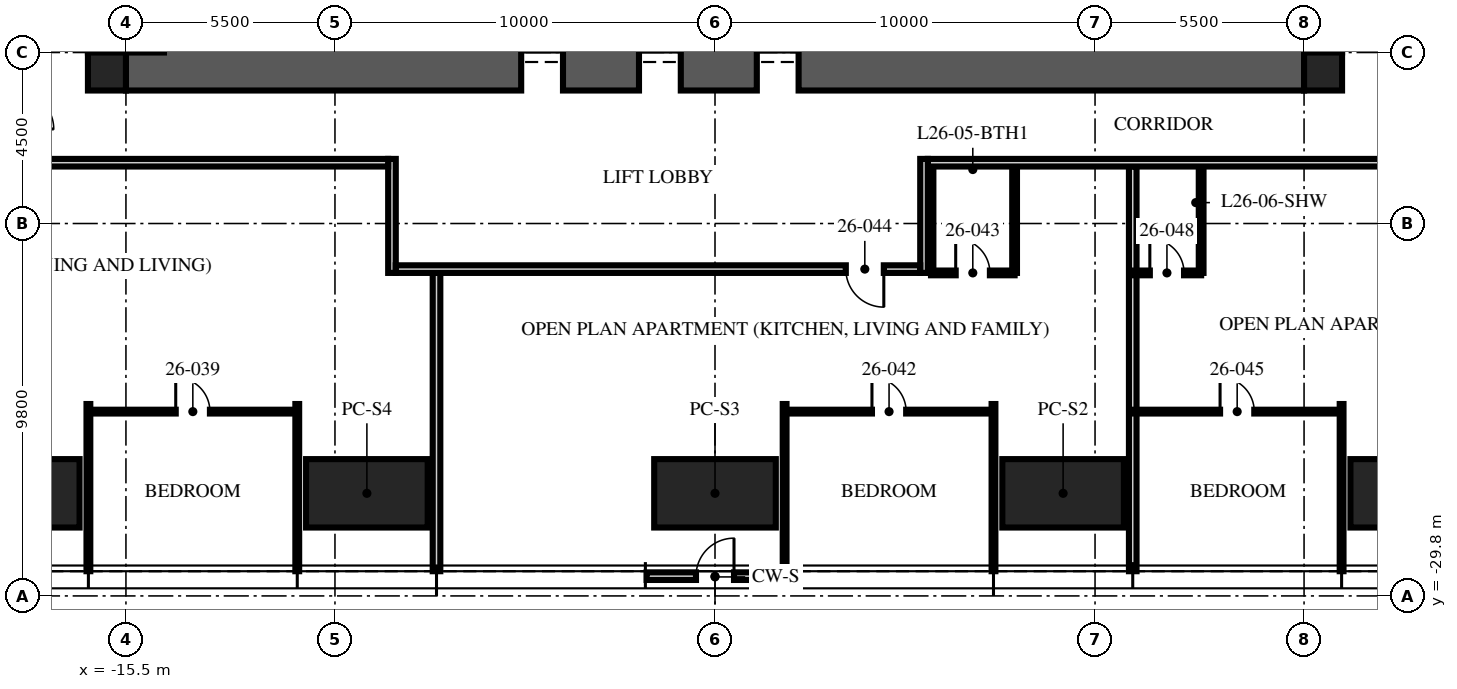
"""IFC4 building model, lengths in metres.
Left out: names, types, materials, properties, quantities, classifications, styles, units other than length and angle.
Written with IfcOpenShell. Run it as: python <this file> out.ifc"""

import sys

from ifc_helpers import new_model, si_unit, direction, frame, frame_2d, origin, origin_2d, place, context, subcontext, project, spatial, rectangle, hollow_rectangle, extrude, element, fill, save


model = new_model("IFC4")
c1 = context("Model", 3, precision=1e-05, world=origin(), true_north=direction((0.0, 1.0)))
c2 = subcontext(c1, "Body", "Model", "MODEL_VIEW")
j1 = project(units=[si_unit("LENGTHUNIT", "METRE"), si_unit("PLANEANGLEUNIT", "RADIAN")], contexts=[c1])
p1 = place(None, origin())
s1 = spatial("IfcSite", under=j1, at=p1, CompositionType="ELEMENT")
p2 = place(p1, origin())
s2 = spatial("IfcBuilding", under=s1, at=p2, CompositionType="ELEMENT")
p3 = place(p2, frame((0.0, 0.0, 107.25)))
s3 = spatial("IfcBuildingStorey", under=s2, at=p3, CompositionType="ELEMENT", Elevation=107.25)
p4 = place(p3, frame((-15.5, -15.5, -0.25), z_axis=(0.0, 0.0, 1.0), x_axis=(1.0, 0.0, 0.0)))
e1 = element("IfcWall", 1, at=p4, inside=s3, PredefinedType="SHEAR", context=c2, shape_type="SweptSolid", body=[
    extrude(rectangle(XDim=31.0, YDim=2.0, at=frame_2d((15.5, 0.0))), origin(), (0.0, 0.0, 1.0), 3.75),
])
p5 = place(p4, frame((10.4, 0.0, 0.25)))
e2 = element("IfcOpeningElement", 2, at=p5, cuts=e1, PredefinedType="OPENING", context=c2, shape_type="SweptSolid", body=[
    extrude(rectangle(XDim=1.1, YDim=2.1, at=frame_2d((0.55, 1.05))), frame((0.0, 1.01, 0.0), z_axis=(0.0, -1.0, 0.0), x_axis=(1.0, 0.0, 0.0)), (0.0, 0.0, 1.0), 2.02),
])
p6 = place(p4, frame((13.5, 0.0, 0.25)))
e3 = element("IfcOpeningElement", 3, at=p6, cuts=e1, PredefinedType="OPENING", context=c2, shape_type="SweptSolid", body=[
    extrude(rectangle(XDim=1.1, YDim=2.1, at=frame_2d((0.55, 1.05))), frame((0.0, 1.01, 0.0), z_axis=(0.0, -1.0, 0.0), x_axis=(1.0, 0.0, 0.0)), (0.0, 0.0, 1.0), 2.02),
])
p7 = place(p4, frame((16.6, 0.0, 0.25)))
e4 = element("IfcOpeningElement", 4, at=p7, cuts=e1, PredefinedType="OPENING", context=c2, shape_type="SweptSolid", body=[
    extrude(rectangle(XDim=1.1, YDim=2.1, at=frame_2d((0.55, 1.05))), frame((0.0, 1.01, 0.0), z_axis=(0.0, -1.0, 0.0), x_axis=(1.0, 0.0, 0.0)), (0.0, 0.0, 1.0), 2.02),
])
for number, where, z_axis, x_axis in (
    (5, (-16.0, -16.0, -0.25), (0.0, 0.0, 1.0), (1.0, 0.0, 0.0)),
    (6, (16.0, -16.0, -0.25), (0.0, 0.0, 1.0), (1.0, 0.0, 0.0)),
):
    element("IfcColumn", number, at=place(p3, frame(where, z_axis=z_axis, x_axis=x_axis)), inside=s3, PredefinedType="COLUMN", context=c2, shape_type="SweptSolid", body=[
        extrude(rectangle(XDim=1.0, YDim=1.0, at=origin_2d()), origin(), (0.0, 0.0, 1.0), 3.75),
    ])
p8 = place(p3, frame((18.32, -27.1, 0.08), z_axis=(0.0, 0.0, 1.0), x_axis=(1.0, 0.0, 0.0)))
e7 = element("IfcColumn", 7, at=p8, inside=s3, PredefinedType="COLUMN", context=c2, shape_type="SweptSolid", body=[
    extrude(hollow_rectangle(XDim=3.2, YDim=1.8, WallThickness=0.2, at=origin_2d()), origin(), (0.0, 0.0, 1.0), 3.67),
])
p9 = place(p3, frame((9.16, -27.1, -0.07), z_axis=(0.0, 0.0, 1.0), x_axis=(1.0, 0.0, 0.0)))
e8 = element("IfcColumn", 8, at=p9, inside=s3, PredefinedType="COLUMN", context=c2, shape_type="SweptSolid", body=[
    extrude(hollow_rectangle(XDim=3.2, YDim=1.8, WallThickness=0.2, at=origin_2d()), origin(), (0.0, 0.0, 1.0), 3.82),
])
p10 = place(p3, frame((0.0, -27.1, -0.23), z_axis=(0.0, 0.0, 1.0), x_axis=(1.0, 0.0, 0.0)))
e9 = element("IfcColumn", 9, at=p10, inside=s3, PredefinedType="COLUMN", context=c2, shape_type="SweptSolid", body=[
    extrude(hollow_rectangle(XDim=3.2, YDim=1.8, WallThickness=0.2, at=origin_2d()), origin(), (0.0, 0.0, 1.0), 3.98),
])
p11 = place(p3, frame((-9.16, -27.1, -0.07), z_axis=(0.0, 0.0, 1.0), x_axis=(1.0, 0.0, 0.0)))
e10 = element("IfcColumn", 10, at=p11, inside=s3, PredefinedType="COLUMN", context=c2, shape_type="SweptSolid", body=[
    extrude(hollow_rectangle(XDim=3.2, YDim=1.8, WallThickness=0.2, at=origin_2d()), origin(), (0.0, 0.0, 1.0), 3.82),
])
p12 = place(p3, frame((-18.32, -27.1, 0.08), z_axis=(0.0, 0.0, 1.0), x_axis=(1.0, 0.0, 0.0)))
e11 = element("IfcColumn", 11, at=p12, inside=s3, PredefinedType="COLUMN", context=c2, shape_type="SweptSolid", body=[
    extrude(hollow_rectangle(XDim=3.2, YDim=1.8, WallThickness=0.2, at=origin_2d()), origin(), (0.0, 0.0, 1.0), 3.67),
])
p13 = place(p3, frame((-1.8, -29.28, 0.0), z_axis=(0.0, 0.0, 1.0), x_axis=(1.0, 0.0, 0.0)))
e12 = element("IfcWall", 12, at=p13, inside=s3, PredefinedType="ELEMENTEDWALL", context=c2, shape_type="SweptSolid", body=[
    extrude(rectangle(XDim=3.599, YDim=0.2, at=frame_2d((1.8, 0.0))), origin(), (0.0, 0.0, 1.0), 3.75),
])
p14 = place(p13, frame((1.3, 0.0, 0.0)))
e13 = element("IfcOpeningElement", 13, at=p14, cuts=e12, PredefinedType="OPENING", context=c2, shape_type="SweptSolid", body=[
    extrude(rectangle(XDim=1.0, YDim=2.4, at=frame_2d((0.5, 1.2))), frame((0.0, 0.11, 0.0), z_axis=(0.0, -1.0, 0.0), x_axis=(1.0, 0.0, 0.0)), (0.0, 0.0, 1.0), 0.22),
])
for number, where, z_axis, x_axis in (
    (14, (-16.488, -24.75, 0.0), (0.0, 0.0, 1.0), (0.0, -1.0, 0.0)),
    (15, (-10.992, -24.75, 0.0), (0.0, 0.0, 1.0), (0.0, -1.0, 0.0)),
):
    element("IfcWall", number, at=place(p3, frame(where, z_axis=z_axis, x_axis=x_axis)), inside=s3, PredefinedType="PARTITIONING", context=c2, shape_type="SweptSolid", body=[
        extrude(rectangle(XDim=4.4, YDim=0.1, at=frame_2d((2.2, 0.0))), origin(), (0.0, 0.0, 1.0), 2.81),
    ])
p15 = place(p3, frame((-7.328, -21.3, 0.0), z_axis=(0.0, 0.0, 1.0), x_axis=(0.0, -1.0, 0.0)))
e16 = element("IfcWall", 16, at=p15, inside=s3, PredefinedType="PARTITIONING", context=c2, shape_type="SweptSolid", body=[
    extrude(rectangle(XDim=7.85, YDim=0.2, at=frame_2d((3.925, 0.0))), origin(), (0.0, 0.0, 1.0), 2.81),
])
for number, where, z_axis, x_axis in (
    (17, (1.832, -24.75, 0.0), (0.0, 0.0, 1.0), (0.0, -1.0, 0.0)),
    (18, (7.328, -24.75, 0.0), (0.0, 0.0, 1.0), (0.0, -1.0, 0.0)),
):
    element("IfcWall", number, at=place(p3, frame(where, z_axis=z_axis, x_axis=x_axis)), inside=s3, PredefinedType="PARTITIONING", context=c2, shape_type="SweptSolid", body=[
        extrude(rectangle(XDim=4.4, YDim=0.1, at=frame_2d((2.2, 0.0))), origin(), (0.0, 0.0, 1.0), 2.81),
    ])
p16 = place(p3, frame((10.992, -18.5, 0.0), z_axis=(0.0, 0.0, 1.0), x_axis=(0.0, -1.0, 0.0)))
e19 = element("IfcWall", 19, at=p16, inside=s3, PredefinedType="PARTITIONING", context=c2, shape_type="SweptSolid", body=[
    extrude(rectangle(XDim=10.65, YDim=0.2, at=frame_2d((5.325, 0.0))), origin(), (0.0, 0.0, 1.0), 2.81),
])
p17 = place(p3, frame((16.488, -24.75, 0.0), z_axis=(0.0, 0.0, 1.0), x_axis=(0.0, -1.0, 0.0)))
e20 = element("IfcWall", 20, at=p17, inside=s3, PredefinedType="PARTITIONING", context=c2, shape_type="SweptSolid", body=[
    extrude(rectangle(XDim=4.4, YDim=0.1, at=frame_2d((2.2, 0.0))), origin(), (0.0, 0.0, 1.0), 2.81),
])
p18 = place(p3, frame((-16.488, -24.95, 0.0), z_axis=(0.0, 0.0, 1.0), x_axis=(1.0, 0.0, 0.0)))
e21 = element("IfcWall", 21, at=p18, inside=s3, PredefinedType="PARTITIONING", context=c2, shape_type="SweptSolid", body=[
    extrude(rectangle(XDim=5.496, YDim=0.1, at=frame_2d((2.748, 0.0))), origin(), (0.0, 0.0, 1.0), 2.81),
])
p19 = place(p18, frame((2.298, 0.0, 0.0)))
e22 = element("IfcOpeningElement", 22, at=p19, cuts=e21, PredefinedType="OPENING", context=c2, shape_type="SweptSolid", body=[
    extrude(rectangle(XDim=0.9, YDim=2.1, at=frame_2d((0.45, 1.05))), frame((0.0, 0.06, 0.0), z_axis=(0.0, -1.0, 0.0), x_axis=(1.0, 0.0, 0.0)), (0.0, 0.0, 1.0), 0.12),
])
p20 = place(p3, frame((1.832, -24.95, 0.0), z_axis=(0.0, 0.0, 1.0), x_axis=(1.0, 0.0, 0.0)))
e23 = element("IfcWall", 23, at=p20, inside=s3, PredefinedType="PARTITIONING", context=c2, shape_type="SweptSolid", body=[
    extrude(rectangle(XDim=5.496, YDim=0.1, at=frame_2d((2.748, 0.0))), origin(), (0.0, 0.0, 1.0), 2.81),
])
p21 = place(p20, frame((2.298, 0.0, 0.0)))
e24 = element("IfcOpeningElement", 24, at=p21, cuts=e23, PredefinedType="OPENING", context=c2, shape_type="SweptSolid", body=[
    extrude(rectangle(XDim=0.9, YDim=2.1, at=frame_2d((0.45, 1.05))), frame((0.0, 0.06, 0.0), z_axis=(0.0, -1.0, 0.0), x_axis=(1.0, 0.0, 0.0)), (0.0, 0.0, 1.0), 0.12),
])
p22 = place(p3, frame((5.684, -21.3, 0.0), z_axis=(0.0, 0.0, 1.0), x_axis=(1.0, 0.0, 0.0)))
e25 = element("IfcWall", 25, at=p22, inside=s3, PredefinedType="PARTITIONING", context=c2, shape_type="SweptSolid", body=[
    extrude(rectangle(XDim=2.2, YDim=0.125, at=frame_2d((1.1, 0.0))), origin(), (0.0, 0.0, 1.0), 3.5),
])
p23 = place(p22, frame((0.65, 0.0, 0.0)))
e26 = element("IfcOpeningElement", 26, at=p23, cuts=e25, PredefinedType="OPENING", context=c2, shape_type="SweptSolid", body=[
    extrude(rectangle(XDim=0.9, YDim=2.1, at=frame_2d((0.45, 1.05))), frame((0.0, 0.073, 0.0), z_axis=(0.0, -1.0, 0.0), x_axis=(1.0, 0.0, 0.0)), (0.0, 0.0, 1.0), 0.145),
])
for number, where, z_axis, x_axis in (
    (27, (5.684, -18.5, 0.0), (0.0, 0.0, 1.0), (0.0, -1.0, 0.0)),
    (28, (7.884, -18.5, 0.0), (0.0, 0.0, 1.0), (0.0, -1.0, 0.0)),
):
    element("IfcWall", number, at=place(p3, frame(where, z_axis=z_axis, x_axis=x_axis)), inside=s3, PredefinedType="PARTITIONING", context=c2, shape_type="SweptSolid", body=[
        extrude(rectangle(XDim=2.8, YDim=0.125, at=frame_2d((1.4, 0.0))), origin(), (0.0, 0.0, 1.0), 3.5),
    ])
p24 = place(p3, frame((10.992, -24.95, 0.0), z_axis=(0.0, 0.0, 1.0), x_axis=(1.0, 0.0, 0.0)))
e29 = element("IfcWall", 29, at=p24, inside=s3, PredefinedType="PARTITIONING", context=c2, shape_type="SweptSolid", body=[
    extrude(rectangle(XDim=5.496, YDim=0.1, at=frame_2d((2.748, 0.0))), origin(), (0.0, 0.0, 1.0), 2.81),
])
p25 = place(p24, frame((2.298, 0.0, 0.0)))
e30 = element("IfcOpeningElement", 30, at=p25, cuts=e29, PredefinedType="OPENING", context=c2, shape_type="SweptSolid", body=[
    extrude(rectangle(XDim=0.9, YDim=2.1, at=frame_2d((0.45, 1.05))), frame((0.0, 0.06, 0.0), z_axis=(0.0, -1.0, 0.0), x_axis=(1.0, 0.0, 0.0)), (0.0, 0.0, 1.0), 0.12),
])
p26 = place(p3, frame((10.992, -21.3, 0.0), z_axis=(0.0, 0.0, 1.0), x_axis=(1.0, 0.0, 0.0)))
e31 = element("IfcWall", 31, at=p26, inside=s3, PredefinedType="PARTITIONING", context=c2, shape_type="SweptSolid", body=[
    extrude(rectangle(XDim=1.8, YDim=0.125, at=frame_2d((0.9, 0.0))), origin(), (0.0, 0.0, 1.0), 3.5),
])
p27 = place(p26, frame((0.45, 0.0, 0.0)))
e32 = element("IfcOpeningElement", 32, at=p27, cuts=e31, PredefinedType="OPENING", context=c2, shape_type="SweptSolid", body=[
    extrude(rectangle(XDim=0.9, YDim=2.1, at=frame_2d((0.45, 1.05))), frame((0.0, 0.073, 0.0), z_axis=(0.0, -1.0, 0.0), x_axis=(1.0, 0.0, 0.0)), (0.0, 0.0, 1.0), 0.145),
])
p28 = place(p3, frame((12.792, -18.5, 0.0), z_axis=(0.0, 0.0, 1.0), x_axis=(0.0, -1.0, 0.0)))
e33 = element("IfcWall", 33, at=p28, inside=s3, PredefinedType="PARTITIONING", context=c2, shape_type="SweptSolid", body=[
    extrude(rectangle(XDim=2.8, YDim=0.125, at=frame_2d((1.4, 0.0))), origin(), (0.0, 0.0, 1.0), 3.5),
])
p29 = place(p3, frame((18.5, -18.4, 0.0), z_axis=(0.0, 0.0, 1.0), x_axis=(-1.0, 0.0, 0.0)))
e34 = element("IfcWall", 34, at=p29, inside=s3, PredefinedType="PARTITIONING", context=c2, shape_type="SweptSolid", body=[
    extrude(rectangle(XDim=12.9, YDim=0.2, at=frame_2d((6.45, 0.0))), origin(), (0.0, 0.0, 1.0), 2.3),
])
for number, where, z_axis, x_axis in (
    (35, (5.5, -18.3, 0.0), (0.0, 0.0, 1.0), (0.0, -1.0, 0.0)),
    (36, (-8.5, -18.3, 0.0), (0.0, 0.0, 1.0), (0.0, -1.0, 0.0)),
):
    element("IfcWall", number, at=place(p3, frame(where, z_axis=z_axis, x_axis=x_axis)), inside=s3, PredefinedType="PARTITIONING", context=c2, shape_type="SweptSolid", body=[
        extrude(rectangle(XDim=3.0, YDim=0.2, at=frame_2d((1.5, 0.0))), origin(), (0.0, 0.0, 1.0), 3.5),
    ])
p30 = place(p3, frame((5.4, -21.2, 0.0), z_axis=(0.0, 0.0, 1.0), x_axis=(-1.0, 0.0, 0.0)))
e37 = element("IfcWall", 37, at=p30, inside=s3, PredefinedType="PARTITIONING", context=c2, shape_type="SweptSolid", body=[
    extrude(rectangle(XDim=13.8, YDim=0.2, at=frame_2d((6.9, 0.0))), origin(), (0.0, 0.0, 1.0), 2.7),
])
p31 = place(p30, frame((0.958, 0.0, 0.0)))
e38 = element("IfcOpeningElement", 38, at=p31, cuts=e37, PredefinedType="OPENING", context=c2, shape_type="SweptSolid", body=[
    extrude(rectangle(XDim=1.0, YDim=2.2, at=frame_2d((0.5, 1.1))), frame((0.0, 0.11, 0.0), z_axis=(0.0, -1.0, 0.0), x_axis=(1.0, 0.0, 0.0)), (0.0, 0.0, 1.0), 0.22),
])
p32 = place(p3, frame((-8.6, -18.4, 0.0), z_axis=(0.0, 0.0, 1.0), x_axis=(-1.0, 0.0, 0.0)))
e39 = element("IfcWall", 39, at=p32, inside=s3, PredefinedType="PARTITIONING", context=c2, shape_type="SweptSolid", body=[
    extrude(rectangle(XDim=9.9, YDim=0.2, at=frame_2d((4.95, 0.0))), origin(), (0.0, 0.0, 1.0), 2.3),
])
p33 = place(p14, origin())
e40 = element("IfcDoor", 40, at=p33, inside=s3, OperationType="SINGLE_SWING_LEFT", PredefinedType="DOOR", context=c2, shape_type="SweptSolid", body=[
    extrude(rectangle(XDim=1.0, YDim=2.4, at=frame_2d((0.5, 1.2))), frame((0.0, 0.025, 0.0), z_axis=(0.0, -1.0, 0.0), x_axis=(1.0, 0.0, 0.0)), (0.0, 0.0, 1.0), 0.05),
])
fill(e13, e40)
p34 = place(p5, origin())
e41 = element("IfcDoor", 41, at=p34, inside=s3, OperationType="DOUBLE_DOOR_SLIDING", PredefinedType="DOOR", context=c2, shape_type="SweptSolid", body=[
    extrude(rectangle(XDim=1.1, YDim=2.1, at=frame_2d((0.55, 1.05))), frame((0.0, 0.025, 0.0), z_axis=(0.0, -1.0, 0.0), x_axis=(1.0, 0.0, 0.0)), (0.0, 0.0, 1.0), 0.05),
])
fill(e2, e41)
p35 = place(p6, origin())
e42 = element("IfcDoor", 42, at=p35, inside=s3, OperationType="DOUBLE_DOOR_SLIDING", PredefinedType="DOOR", context=c2, shape_type="SweptSolid", body=[
    extrude(rectangle(XDim=1.1, YDim=2.1, at=frame_2d((0.55, 1.05))), frame((0.0, 0.025, 0.0), z_axis=(0.0, -1.0, 0.0), x_axis=(1.0, 0.0, 0.0)), (0.0, 0.0, 1.0), 0.05),
])
fill(e3, e42)
p36 = place(p7, origin())
e43 = element("IfcDoor", 43, at=p36, inside=s3, OperationType="DOUBLE_DOOR_SLIDING", PredefinedType="DOOR", context=c2, shape_type="SweptSolid", body=[
    extrude(rectangle(XDim=1.1, YDim=2.1, at=frame_2d((0.55, 1.05))), frame((0.0, 0.025, 0.0), z_axis=(0.0, -1.0, 0.0), x_axis=(1.0, 0.0, 0.0)), (0.0, 0.0, 1.0), 0.05),
])
fill(e4, e43)
p37 = place(p19, origin())
e44 = element("IfcDoor", 44, at=p37, inside=s3, OperationType="SINGLE_SWING_LEFT", PredefinedType="DOOR", context=c2, shape_type="SweptSolid", body=[
    extrude(rectangle(XDim=0.9, YDim=2.1, at=frame_2d((0.45, 1.05))), frame((0.0, 0.025, 0.0), z_axis=(0.0, -1.0, 0.0), x_axis=(1.0, 0.0, 0.0)), (0.0, 0.0, 1.0), 0.05),
])
fill(e22, e44)
p38 = place(p21, origin())
e45 = element("IfcDoor", 45, at=p38, inside=s3, OperationType="SINGLE_SWING_LEFT", PredefinedType="DOOR", context=c2, shape_type="SweptSolid", body=[
    extrude(rectangle(XDim=0.9, YDim=2.1, at=frame_2d((0.45, 1.05))), frame((0.0, 0.025, 0.0), z_axis=(0.0, -1.0, 0.0), x_axis=(1.0, 0.0, 0.0)), (0.0, 0.0, 1.0), 0.05),
])
fill(e24, e45)
p39 = place(p23, origin())
e46 = element("IfcDoor", 46, at=p39, inside=s3, OperationType="SINGLE_SWING_LEFT", PredefinedType="DOOR", context=c2, shape_type="SweptSolid", body=[
    extrude(rectangle(XDim=0.9, YDim=2.1, at=frame_2d((0.45, 1.05))), frame((0.0, 0.025, 0.0), z_axis=(0.0, -1.0, 0.0), x_axis=(1.0, 0.0, 0.0)), (0.0, 0.0, 1.0), 0.05),
])
fill(e26, e46)
p40 = place(p31, origin())
e47 = element("IfcDoor", 47, at=p40, inside=s3, OperationType="SINGLE_SWING_LEFT", PredefinedType="DOOR", context=c2, shape_type="SweptSolid", body=[
    extrude(rectangle(XDim=1.0, YDim=2.2, at=frame_2d((0.5, 1.1))), frame((0.0, 0.025, 0.0), z_axis=(0.0, -1.0, 0.0), x_axis=(1.0, 0.0, 0.0)), (0.0, 0.0, 1.0), 0.05),
])
fill(e38, e47)
p41 = place(p25, origin())
e48 = element("IfcDoor", 48, at=p41, inside=s3, OperationType="SINGLE_SWING_LEFT", PredefinedType="DOOR", context=c2, shape_type="SweptSolid", body=[
    extrude(rectangle(XDim=0.9, YDim=2.1, at=frame_2d((0.45, 1.05))), frame((0.0, 0.025, 0.0), z_axis=(0.0, -1.0, 0.0), x_axis=(1.0, 0.0, 0.0)), (0.0, 0.0, 1.0), 0.05),
])
fill(e30, e48)
p42 = place(p27, origin())
e49 = element("IfcDoor", 49, at=p42, inside=s3, OperationType="SINGLE_SWING_LEFT", PredefinedType="DOOR", context=c2, shape_type="SweptSolid", body=[
    extrude(rectangle(XDim=0.9, YDim=2.1, at=frame_2d((0.45, 1.05))), frame((0.0, 0.025, 0.0), z_axis=(0.0, -1.0, 0.0), x_axis=(1.0, 0.0, 0.0)), (0.0, 0.0, 1.0), 0.05),
])
fill(e32, e49)
save(model, sys.argv[1])
